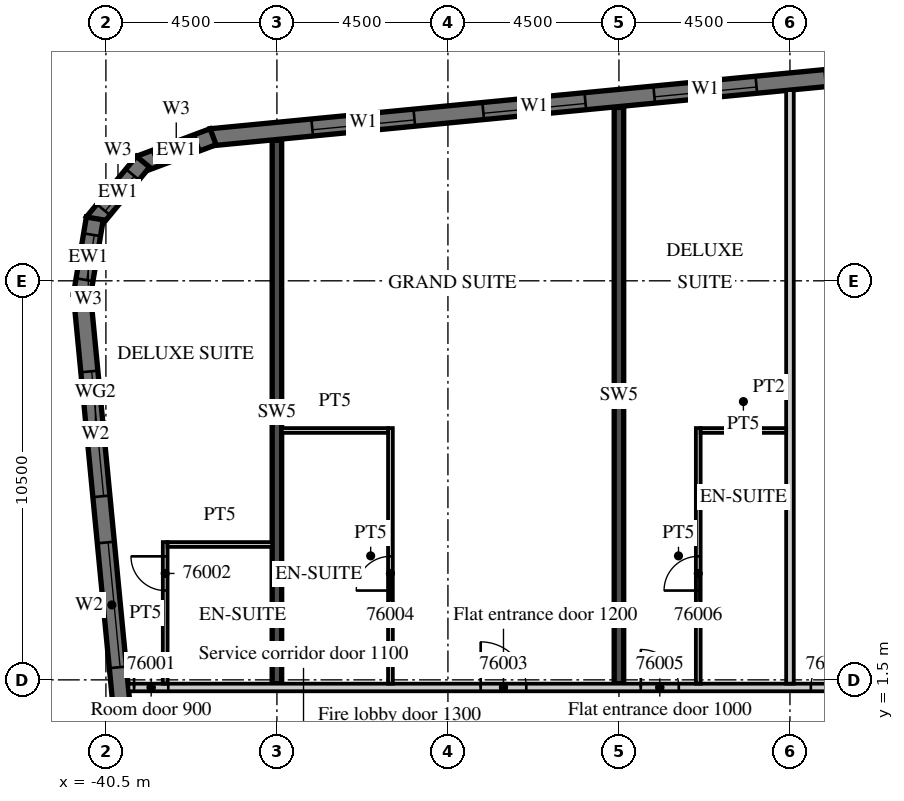
"""IFC4 building model, lengths in metres.
Left out: names, types, materials, properties, quantities, classifications, styles, units other than length and angle.
Written with IfcOpenShell. Run it as: python <this file> out.ifc"""

import sys

from ifc_helpers import new_model, si_unit, direction, frame, frame_2d, origin, place, context, subcontext, project, spatial, polyline, rectangle, outline, extrude, element, fill, save


model = new_model("IFC4")
c1 = context("Model", 3, precision=1e-05, world=origin(), true_north=direction((0.0, 1.0)))
c2 = subcontext(c1, "Body", "Model", "MODEL_VIEW")
j1 = project(units=[si_unit("LENGTHUNIT", "METRE"), si_unit("PLANEANGLEUNIT", "RADIAN")], contexts=[c1])
p1 = place(None, origin())
s1 = spatial("IfcSite", under=j1, at=p1, CompositionType="ELEMENT")
p2 = place(p1, origin())
s2 = spatial("IfcBuilding", under=s1, at=p2, CompositionType="ELEMENT")
p3 = place(p2, frame((0.0, 0.0, 301.5)))
s3 = spatial("IfcBuildingStorey", under=s2, at=p3, CompositionType="ELEMENT", Elevation=301.5)
p4 = place(p3, frame((-36.0, 1.4, 0.0), z_axis=(0.0, 0.0, 1.0), x_axis=(0.0, 1.0, 0.0)))
e1 = element("IfcWall", 1, at=p4, inside=s3, PredefinedType="SHEAR", context=c2, shape_type="SweptSolid", body=[
    extrude(rectangle(XDim=14.296, YDim=0.25, at=frame_2d((7.148, 0.0))), origin(), (0.0, 0.0, 1.0), 3.3),
])
p5 = place(p3, frame((-27.0, 1.4, 0.0), z_axis=(0.0, 0.0, 1.0), x_axis=(0.0, 1.0, 0.0)))
e2 = element("IfcWall", 2, at=p5, inside=s3, PredefinedType="SHEAR", context=c2, shape_type="SweptSolid", body=[
    extrude(rectangle(XDim=15.163, YDim=0.25, at=frame_2d((7.582, 0.0))), origin(), (0.0, 0.0, 1.0), 3.3),
])
p6 = place(p3, frame((-41.132, 11.658, 0.0), z_axis=(0.0, 0.0, 1.0), x_axis=(0.095847749461, -0.995396006082, 0.0)))
e3 = element("IfcWall", 3, at=p6, inside=s3, PredefinedType="SOLIDWALL", context=c2, shape_type="SweptSolid", body=[
    extrude(rectangle(XDim=32.0, YDim=0.45, at=frame_2d((16.0, 0.0))), origin(), (0.0, 0.0, 1.0), 3.02),
])
p7 = place(p6, frame((2.053, 0.0, 0.45)))
e4 = element("IfcOpeningElement", 4, at=p7, cuts=e3, PredefinedType="OPENING", context=c2, shape_type="SweptSolid", body=[
    extrude(rectangle(XDim=3.3, YDim=2.25, at=frame_2d((1.65, 1.125))), frame((0.0, 0.235, 0.0), z_axis=(0.0, -1.0, 0.0), x_axis=(1.0, 0.0, 0.0)), (0.0, 0.0, 1.0), 0.47),
])
p8 = place(p6, frame((6.574, 0.0, 0.45)))
e5 = element("IfcOpeningElement", 5, at=p8, cuts=e3, PredefinedType="OPENING", context=c2, shape_type="SweptSolid", body=[
    extrude(rectangle(XDim=3.3, YDim=2.25, at=frame_2d((1.65, 1.125))), frame((0.0, 0.235, 0.0), z_axis=(0.0, -1.0, 0.0), x_axis=(1.0, 0.0, 0.0)), (0.0, 0.0, 1.0), 0.47),
])
p9 = place(p3, frame((13.521, 20.713, 0.0), z_axis=(0.0, 0.0, 1.0), x_axis=(-0.995396277313, -0.095844932638, 0.0)))
e6 = element("IfcWall", 6, at=p9, inside=s3, PredefinedType="SOLIDWALL", context=c2, shape_type="SweptSolid", body=[
    extrude(rectangle(XDim=51.495, YDim=0.45, at=frame_2d((25.748, 0.0))), origin(), (0.0, 0.0, 1.0), 3.02),
])
p10 = place(p9, frame((0.91, 0.0, 0.45)))
e7 = element("IfcOpeningElement", 7, at=p10, cuts=e6, PredefinedType="OPENING", context=c2, shape_type="SweptSolid", body=[
    extrude(rectangle(XDim=2.7, YDim=2.25, at=frame_2d((1.35, 1.125))), frame((0.0, 0.235, 0.0), z_axis=(0.0, -1.0, 0.0), x_axis=(1.0, 0.0, 0.0)), (0.0, 0.0, 1.0), 0.47),
])
p11 = place(p9, frame((5.431, 0.0, 0.45)))
e8 = element("IfcOpeningElement", 8, at=p11, cuts=e6, PredefinedType="OPENING", context=c2, shape_type="SweptSolid", body=[
    extrude(rectangle(XDim=2.7, YDim=2.25, at=frame_2d((1.35, 1.125))), frame((0.0, 0.235, 0.0), z_axis=(0.0, -1.0, 0.0), x_axis=(1.0, 0.0, 0.0)), (0.0, 0.0, 1.0), 0.47),
])
p12 = place(p9, frame((9.952, 0.0, 0.45)))
e9 = element("IfcOpeningElement", 9, at=p12, cuts=e6, PredefinedType="OPENING", context=c2, shape_type="SweptSolid", body=[
    extrude(rectangle(XDim=2.7, YDim=2.25, at=frame_2d((1.35, 1.125))), frame((0.0, 0.235, 0.0), z_axis=(0.0, -1.0, 0.0), x_axis=(1.0, 0.0, 0.0)), (0.0, 0.0, 1.0), 0.47),
])
p13 = place(p9, frame((14.473, 0.0, 0.45)))
e10 = element("IfcOpeningElement", 10, at=p13, cuts=e6, PredefinedType="OPENING", context=c2, shape_type="SweptSolid", body=[
    extrude(rectangle(XDim=2.7, YDim=2.25, at=frame_2d((1.35, 1.125))), frame((0.0, 0.235, 0.0), z_axis=(0.0, -1.0, 0.0), x_axis=(1.0, 0.0, 0.0)), (0.0, 0.0, 1.0), 0.47),
])
p14 = place(p9, frame((18.994, 0.0, 0.45)))
e11 = element("IfcOpeningElement", 11, at=p14, cuts=e6, PredefinedType="OPENING", context=c2, shape_type="SweptSolid", body=[
    extrude(rectangle(XDim=2.7, YDim=2.25, at=frame_2d((1.35, 1.125))), frame((0.0, 0.235, 0.0), z_axis=(0.0, -1.0, 0.0), x_axis=(1.0, 0.0, 0.0)), (0.0, 0.0, 1.0), 0.47),
])
p15 = place(p9, frame((23.514, 0.0, 0.45)))
e12 = element("IfcOpeningElement", 12, at=p15, cuts=e6, PredefinedType="OPENING", context=c2, shape_type="SweptSolid", body=[
    extrude(rectangle(XDim=2.7, YDim=2.25, at=frame_2d((1.35, 1.125))), frame((0.0, 0.235, 0.0), z_axis=(0.0, -1.0, 0.0), x_axis=(1.0, 0.0, 0.0)), (0.0, 0.0, 1.0), 0.47),
])
p16 = place(p9, frame((28.035, 0.0, 0.45)))
e13 = element("IfcOpeningElement", 13, at=p16, cuts=e6, PredefinedType="OPENING", context=c2, shape_type="SweptSolid", body=[
    extrude(rectangle(XDim=2.7, YDim=2.25, at=frame_2d((1.35, 1.125))), frame((0.0, 0.235, 0.0), z_axis=(0.0, -1.0, 0.0), x_axis=(1.0, 0.0, 0.0)), (0.0, 0.0, 1.0), 0.47),
])
p17 = place(p9, frame((32.556, 0.0, 0.45)))
e14 = element("IfcOpeningElement", 14, at=p17, cuts=e6, PredefinedType="OPENING", context=c2, shape_type="SweptSolid", body=[
    extrude(rectangle(XDim=2.7, YDim=2.25, at=frame_2d((1.35, 1.125))), frame((0.0, 0.235, 0.0), z_axis=(0.0, -1.0, 0.0), x_axis=(1.0, 0.0, 0.0)), (0.0, 0.0, 1.0), 0.47),
])
p18 = place(p9, frame((37.077, 0.0, 0.45)))
e15 = element("IfcOpeningElement", 15, at=p18, cuts=e6, PredefinedType="OPENING", context=c2, shape_type="SweptSolid", body=[
    extrude(rectangle(XDim=2.7, YDim=2.25, at=frame_2d((1.35, 1.125))), frame((0.0, 0.235, 0.0), z_axis=(0.0, -1.0, 0.0), x_axis=(1.0, 0.0, 0.0)), (0.0, 0.0, 1.0), 0.47),
])
p19 = place(p9, frame((41.598, 0.0, 0.45)))
e16 = element("IfcOpeningElement", 16, at=p19, cuts=e6, PredefinedType="OPENING", context=c2, shape_type="SweptSolid", body=[
    extrude(rectangle(XDim=2.7, YDim=2.25, at=frame_2d((1.35, 1.125))), frame((0.0, 0.235, 0.0), z_axis=(0.0, -1.0, 0.0), x_axis=(1.0, 0.0, 0.0)), (0.0, 0.0, 1.0), 0.47),
])
p20 = place(p9, frame((46.118, 0.0, 0.45)))
e17 = element("IfcOpeningElement", 17, at=p20, cuts=e6, PredefinedType="OPENING", context=c2, shape_type="SweptSolid", body=[
    extrude(rectangle(XDim=2.7, YDim=2.25, at=frame_2d((1.35, 1.125))), frame((0.0, 0.235, 0.0), z_axis=(0.0, -1.0, 0.0), x_axis=(1.0, 0.0, 0.0)), (0.0, 0.0, 1.0), 0.47),
])
p21 = place(p3, frame((-37.679, 15.791, 0.0), z_axis=(0.0, 0.0, 1.0), x_axis=(-0.936677599948, -0.350192909346, 0.0)))
e18 = element("IfcWall", 18, at=p21, inside=s3, PredefinedType="SOLIDWALL", context=c2, shape_type="SweptSolid", body=[
    extrude(outline(polyline([(0.0, -0.225), (2.071, -0.225), (1.95, 0.225), (0.121, 0.225), (0.0, -0.225)])), origin(), (0.0, 0.0, 1.0), 3.02),
])
p22 = place(p21, frame((0.435, 0.0, 0.45)))
e19 = element("IfcOpeningElement", 19, at=p22, cuts=e18, PredefinedType="OPENING", context=c2, shape_type="SweptSolid", body=[
    extrude(rectangle(XDim=1.2, YDim=2.25, at=frame_2d((0.6, 1.125))), frame((0.0, 0.235, 0.0), z_axis=(0.0, -1.0, 0.0), x_axis=(1.0, 0.0, 0.0)), (0.0, 0.0, 1.0), 0.47),
])
p23 = place(p3, frame((-39.524, 15.133, 0.0), z_axis=(0.0, 0.0, 1.0), x_axis=(-0.636046112757, -0.771651049663, 0.0)))
e20 = element("IfcWall", 20, at=p23, inside=s3, PredefinedType="SOLIDWALL", context=c2, shape_type="SweptSolid", body=[
    extrude(outline(polyline([(0.0, -0.225), (2.071, -0.225), (1.95, 0.225), (0.121, 0.225), (0.0, -0.225)])), origin(), (0.0, 0.0, 1.0), 3.02),
])
p24 = place(p23, frame((0.435, 0.0, 0.45)))
e21 = element("IfcOpeningElement", 21, at=p24, cuts=e20, PredefinedType="OPENING", context=c2, shape_type="SweptSolid", body=[
    extrude(rectangle(XDim=1.2, YDim=2.25, at=frame_2d((0.6, 1.125))), frame((0.0, 0.235, 0.0), z_axis=(0.0, -1.0, 0.0), x_axis=(1.0, 0.0, 0.0)), (0.0, 0.0, 1.0), 0.47),
])
p25 = place(p3, frame((-40.792, 13.641, 0.0), z_axis=(0.0, 0.0, 1.0), x_axis=(-0.165068144653, -0.986282164302, 0.0)))
e22 = element("IfcWall", 22, at=p25, inside=s3, PredefinedType="SOLIDWALL", context=c2, shape_type="SweptSolid", body=[
    extrude(outline(polyline([(0.0, -0.225), (2.071, -0.225), (1.95, 0.225), (0.121, 0.225), (0.0, -0.225)])), origin(), (0.0, 0.0, 1.0), 3.02),
])
p26 = place(p25, frame((0.435, 0.0, 0.45)))
e23 = element("IfcOpeningElement", 23, at=p26, cuts=e22, PredefinedType="OPENING", context=c2, shape_type="SweptSolid", body=[
    extrude(rectangle(XDim=1.2, YDim=2.25, at=frame_2d((0.6, 1.125))), frame((0.0, 0.235, 0.0), z_axis=(0.0, -1.0, 0.0), x_axis=(1.0, 0.0, 0.0)), (0.0, 0.0, 1.0), 0.47),
])
p27 = place(p3, frame((-39.909, 1.3, 0.0), z_axis=(0.0, 0.0, 1.0), x_axis=(1.0, 0.0, 0.0)))
e24 = element("IfcWall", 24, at=p27, inside=s3, PredefinedType="PARTITIONING", context=c2, shape_type="SweptSolid", body=[
    extrude(rectangle(XDim=53.409, YDim=0.2, at=frame_2d((26.705, 0.0))), origin(), (0.0, 0.0, 1.0), 3.02),
])
p28 = place(p27, frame((0.15, 0.0, 0.0)))
e25 = element("IfcOpeningElement", 25, at=p28, cuts=e24, PredefinedType="OPENING", context=c2, shape_type="SweptSolid", body=[
    extrude(rectangle(XDim=0.9, YDim=2.1, at=frame_2d((0.45, 1.05))), frame((0.0, 0.11, 0.0), z_axis=(0.0, -1.0, 0.0), x_axis=(1.0, 0.0, 0.0)), (0.0, 0.0, 1.0), 0.22),
])
p29 = place(p27, frame((9.271, 0.0, 0.0)))
e26 = element("IfcOpeningElement", 26, at=p29, cuts=e24, PredefinedType="OPENING", context=c2, shape_type="SweptSolid", body=[
    extrude(rectangle(XDim=1.2, YDim=2.1, at=frame_2d((0.6, 1.05))), frame((0.0, 0.11, 0.0), z_axis=(0.0, -1.0, 0.0), x_axis=(1.0, 0.0, 0.0)), (0.0, 0.0, 1.0), 0.22),
])
p30 = place(p27, frame((13.484, 0.0, 0.0)))
e27 = element("IfcOpeningElement", 27, at=p30, cuts=e24, PredefinedType="OPENING", context=c2, shape_type="SweptSolid", body=[
    extrude(rectangle(XDim=1.0, YDim=2.1, at=frame_2d((0.5, 1.05))), frame((0.0, 0.11, 0.0), z_axis=(0.0, -1.0, 0.0), x_axis=(1.0, 0.0, 0.0)), (0.0, 0.0, 1.0), 0.22),
])
p31 = place(p27, frame((17.959, 0.0, 0.0)))
e28 = element("IfcOpeningElement", 28, at=p31, cuts=e24, PredefinedType="OPENING", context=c2, shape_type="SweptSolid", body=[
    extrude(rectangle(XDim=1.0, YDim=2.1, at=frame_2d((0.5, 1.05))), frame((0.0, 0.11, 0.0), z_axis=(0.0, -1.0, 0.0), x_axis=(1.0, 0.0, 0.0)), (0.0, 0.0, 1.0), 0.22),
])
p32 = place(p27, frame((24.859, 0.0, 0.0)))
e29 = element("IfcOpeningElement", 29, at=p32, cuts=e24, PredefinedType="OPENING", context=c2, shape_type="SweptSolid", body=[
    extrude(rectangle(XDim=1.0, YDim=2.1, at=frame_2d((0.5, 1.05))), frame((0.0, 0.11, 0.0), z_axis=(0.0, -1.0, 0.0), x_axis=(1.0, 0.0, 0.0)), (0.0, 0.0, 1.0), 0.22),
])
p33 = place(p27, frame((29.334, 0.0, 0.0)))
e30 = element("IfcOpeningElement", 30, at=p33, cuts=e24, PredefinedType="OPENING", context=c2, shape_type="SweptSolid", body=[
    extrude(rectangle(XDim=1.0, YDim=2.1, at=frame_2d((0.5, 1.05))), frame((0.0, 0.11, 0.0), z_axis=(0.0, -1.0, 0.0), x_axis=(1.0, 0.0, 0.0)), (0.0, 0.0, 1.0), 0.22),
])
p34 = place(p27, frame((36.271, 0.0, 0.0)))
e31 = element("IfcOpeningElement", 31, at=p34, cuts=e24, PredefinedType="OPENING", context=c2, shape_type="SweptSolid", body=[
    extrude(rectangle(XDim=1.2, YDim=2.1, at=frame_2d((0.6, 1.05))), frame((0.0, 0.11, 0.0), z_axis=(0.0, -1.0, 0.0), x_axis=(1.0, 0.0, 0.0)), (0.0, 0.0, 1.0), 0.22),
])
p35 = place(p27, frame((40.484, 0.0, 0.0)))
e32 = element("IfcOpeningElement", 32, at=p35, cuts=e24, PredefinedType="OPENING", context=c2, shape_type="SweptSolid", body=[
    extrude(rectangle(XDim=1.0, YDim=2.1, at=frame_2d((0.5, 1.05))), frame((0.0, 0.11, 0.0), z_axis=(0.0, -1.0, 0.0), x_axis=(1.0, 0.0, 0.0)), (0.0, 0.0, 1.0), 0.22),
])
p36 = place(p27, frame((47.334, 0.0, 0.0)))
e33 = element("IfcOpeningElement", 33, at=p36, cuts=e24, PredefinedType="OPENING", context=c2, shape_type="SweptSolid", body=[
    extrude(rectangle(XDim=1.0, YDim=2.1, at=frame_2d((0.5, 1.05))), frame((0.0, 0.11, 0.0), z_axis=(0.0, -1.0, 0.0), x_axis=(1.0, 0.0, 0.0)), (0.0, 0.0, 1.0), 0.22),
])
p37 = place(p27, frame((51.834, 0.0, 0.0)))
e34 = element("IfcOpeningElement", 34, at=p37, cuts=e24, PredefinedType="OPENING", context=c2, shape_type="SweptSolid", body=[
    extrude(rectangle(XDim=1.0, YDim=2.1, at=frame_2d((0.5, 1.05))), frame((0.0, 0.11, 0.0), z_axis=(0.0, -1.0, 0.0), x_axis=(1.0, 0.0, 0.0)), (0.0, 0.0, 1.0), 0.22),
])
p38 = place(p3, frame((-38.94, 1.4, 0.0), z_axis=(0.0, 0.0, 1.0), x_axis=(0.0, 1.0, 0.0)))
e35 = element("IfcWall", 35, at=p38, inside=s3, PredefinedType="PARTITIONING", context=c2, shape_type="SweptSolid", body=[
    extrude(rectangle(XDim=3.725, YDim=0.125, at=frame_2d((1.863, 0.0))), origin(), (0.0, 0.0, 1.0), 3.02),
])
p39 = place(p38, frame((2.45, 0.0, 0.0)))
e36 = element("IfcOpeningElement", 36, at=p39, cuts=e35, PredefinedType="OPENING", context=c2, shape_type="SweptSolid", body=[
    extrude(rectangle(XDim=0.9, YDim=2.1, at=frame_2d((0.45, 1.05))), frame((0.0, 0.073, 0.0), z_axis=(0.0, -1.0, 0.0), x_axis=(1.0, 0.0, 0.0)), (0.0, 0.0, 1.0), 0.145),
])
p40 = place(p3, frame((-38.878, 5.062, 0.0), z_axis=(0.0, 0.0, 1.0), x_axis=(1.0, 0.0, 0.0)))
e37 = element("IfcWall", 37, at=p40, inside=s3, PredefinedType="PARTITIONING", context=c2, shape_type="SweptSolid", body=[
    extrude(rectangle(XDim=2.753, YDim=0.125, at=frame_2d((1.376, 0.0))), origin(), (0.0, 0.0, 1.0), 3.02),
])
p41 = place(p3, frame((-33.013, 1.4, 0.0), z_axis=(0.0, 0.0, 1.0), x_axis=(0.0, 1.0, 0.0)))
e38 = element("IfcWall", 38, at=p41, inside=s3, PredefinedType="PARTITIONING", context=c2, shape_type="SweptSolid", body=[
    extrude(rectangle(XDim=6.725, YDim=0.125, at=frame_2d((3.363, 0.0))), origin(), (0.0, 0.0, 1.0), 3.02),
])
p42 = place(p41, frame((2.45, 0.0, 0.0)))
e39 = element("IfcOpeningElement", 39, at=p42, cuts=e38, PredefinedType="OPENING", context=c2, shape_type="SweptSolid", body=[
    extrude(rectangle(XDim=0.9, YDim=2.1, at=frame_2d((0.45, 1.05))), frame((0.0, 0.073, 0.0), z_axis=(0.0, -1.0, 0.0), x_axis=(1.0, 0.0, 0.0)), (0.0, 0.0, 1.0), 0.145),
])
p43 = place(p3, frame((-35.875, 8.062, 0.0), z_axis=(0.0, 0.0, 1.0), x_axis=(1.0, 0.0, 0.0)))
e40 = element("IfcWall", 40, at=p43, inside=s3, PredefinedType="PARTITIONING", context=c2, shape_type="SweptSolid", body=[
    extrude(rectangle(XDim=2.8, YDim=0.125, at=frame_2d((1.4, 0.0))), origin(), (0.0, 0.0, 1.0), 3.02),
])
p44 = place(p3, frame((-22.5, 1.4, 0.0), z_axis=(0.0, 0.0, 1.0), x_axis=(0.0, 1.0, 0.0)))
e41 = element("IfcWall", 41, at=p44, inside=s3, PredefinedType="PARTITIONING", context=c2, shape_type="SweptSolid", body=[
    extrude(rectangle(XDim=15.618, YDim=0.2, at=frame_2d((7.809, 0.0))), origin(), (0.0, 0.0, 1.0), 3.02),
])
p45 = place(p3, frame((-24.913, 1.4, 0.0), z_axis=(0.0, 0.0, 1.0), x_axis=(0.0, 1.0, 0.0)))
e42 = element("IfcWall", 42, at=p45, inside=s3, PredefinedType="PARTITIONING", context=c2, shape_type="SweptSolid", body=[
    extrude(rectangle(XDim=6.725, YDim=0.125, at=frame_2d((3.363, 0.0))), origin(), (0.0, 0.0, 1.0), 3.02),
])
p46 = place(p45, frame((2.45, 0.0, 0.0)))
e43 = element("IfcOpeningElement", 43, at=p46, cuts=e42, PredefinedType="OPENING", context=c2, shape_type="SweptSolid", body=[
    extrude(rectangle(XDim=0.9, YDim=2.1, at=frame_2d((0.45, 1.05))), frame((0.0, 0.073, 0.0), z_axis=(0.0, -1.0, 0.0), x_axis=(1.0, 0.0, 0.0)), (0.0, 0.0, 1.0), 0.145),
])
p47 = place(p3, frame((-24.85, 8.062, 0.0), z_axis=(0.0, 0.0, 1.0), x_axis=(1.0, 0.0, 0.0)))
e44 = element("IfcWall", 44, at=p47, inside=s3, PredefinedType="PARTITIONING", context=c2, shape_type="SweptSolid", body=[
    extrude(rectangle(XDim=2.25, YDim=0.125, at=frame_2d((1.125, 0.0))), origin(), (0.0, 0.0, 1.0), 3.02),
])
p48 = place(p7, origin())
e45 = element("IfcWindow", 45, at=p48, inside=s3, PartitioningType="SINGLE_PANEL", PredefinedType="WINDOW", context=c2, shape_type="SweptSolid", body=[
    extrude(rectangle(XDim=3.3, YDim=2.25, at=frame_2d((1.65, 1.125))), frame((0.0, 0.09, 0.0), z_axis=(0.0, -1.0, 0.0), x_axis=(1.0, 0.0, 0.0)), (0.0, 0.0, 1.0), 0.06),
])
fill(e4, e45)
p49 = place(p8, origin())
e46 = element("IfcWindow", 46, at=p49, inside=s3, PartitioningType="SINGLE_PANEL", PredefinedType="WINDOW", context=c2, shape_type="SweptSolid", body=[
    extrude(rectangle(XDim=3.3, YDim=2.25, at=frame_2d((1.65, 1.125))), frame((0.0, 0.09, 0.0), z_axis=(0.0, -1.0, 0.0), x_axis=(1.0, 0.0, 0.0)), (0.0, 0.0, 1.0), 0.06),
])
fill(e5, e46)
p50 = place(p18, origin())
e47 = element("IfcWindow", 47, at=p50, inside=s3, PartitioningType="SINGLE_PANEL", PredefinedType="WINDOW", context=c2, shape_type="SweptSolid", body=[
    extrude(rectangle(XDim=2.7, YDim=2.25, at=frame_2d((1.35, 1.125))), frame((0.0, 0.09, 0.0), z_axis=(0.0, -1.0, 0.0), x_axis=(1.0, 0.0, 0.0)), (0.0, 0.0, 1.0), 0.06),
])
fill(e15, e47)
p51 = place(p19, origin())
e48 = element("IfcWindow", 48, at=p51, inside=s3, PartitioningType="SINGLE_PANEL", PredefinedType="WINDOW", context=c2, shape_type="SweptSolid", body=[
    extrude(rectangle(XDim=2.7, YDim=2.25, at=frame_2d((1.35, 1.125))), frame((0.0, 0.09, 0.0), z_axis=(0.0, -1.0, 0.0), x_axis=(1.0, 0.0, 0.0)), (0.0, 0.0, 1.0), 0.06),
])
fill(e16, e48)
p52 = place(p20, origin())
e49 = element("IfcWindow", 49, at=p52, inside=s3, PartitioningType="SINGLE_PANEL", PredefinedType="WINDOW", context=c2, shape_type="SweptSolid", body=[
    extrude(rectangle(XDim=2.7, YDim=2.25, at=frame_2d((1.35, 1.125))), frame((0.0, 0.09, 0.0), z_axis=(0.0, -1.0, 0.0), x_axis=(1.0, 0.0, 0.0)), (0.0, 0.0, 1.0), 0.06),
])
fill(e17, e49)
p53 = place(p22, origin())
e50 = element("IfcWindow", 50, at=p53, inside=s3, PartitioningType="SINGLE_PANEL", PredefinedType="WINDOW", context=c2, shape_type="SweptSolid", body=[
    extrude(rectangle(XDim=1.2, YDim=2.25, at=frame_2d((0.6, 1.125))), frame((0.0, 0.09, 0.0), z_axis=(0.0, -1.0, 0.0), x_axis=(1.0, 0.0, 0.0)), (0.0, 0.0, 1.0), 0.06),
])
fill(e19, e50)
p54 = place(p24, origin())
e51 = element("IfcWindow", 51, at=p54, inside=s3, PartitioningType="SINGLE_PANEL", PredefinedType="WINDOW", context=c2, shape_type="SweptSolid", body=[
    extrude(rectangle(XDim=1.2, YDim=2.25, at=frame_2d((0.6, 1.125))), frame((0.0, 0.09, 0.0), z_axis=(0.0, -1.0, 0.0), x_axis=(1.0, 0.0, 0.0)), (0.0, 0.0, 1.0), 0.06),
])
fill(e21, e51)
p55 = place(p26, origin())
e52 = element("IfcWindow", 52, at=p55, inside=s3, PartitioningType="SINGLE_PANEL", PredefinedType="WINDOW", context=c2, shape_type="SweptSolid", body=[
    extrude(rectangle(XDim=1.2, YDim=2.25, at=frame_2d((0.6, 1.125))), frame((0.0, 0.09, 0.0), z_axis=(0.0, -1.0, 0.0), x_axis=(1.0, 0.0, 0.0)), (0.0, 0.0, 1.0), 0.06),
])
fill(e23, e52)
p56 = place(p28, origin())
e53 = element("IfcDoor", 53, at=p56, inside=s3, OperationType="SINGLE_SWING_LEFT", PredefinedType="DOOR", context=c2, shape_type="SweptSolid", body=[
    extrude(rectangle(XDim=0.9, YDim=2.1, at=frame_2d((0.45, 1.05))), frame((0.0, 0.025, 0.0), z_axis=(0.0, -1.0, 0.0), x_axis=(1.0, 0.0, 0.0)), (0.0, 0.0, 1.0), 0.05),
])
fill(e25, e53)
p57 = place(p39, origin())
e54 = element("IfcDoor", 54, at=p57, inside=s3, OperationType="SINGLE_SWING_RIGHT", PredefinedType="DOOR", context=c2, shape_type="SweptSolid", body=[
    extrude(rectangle(XDim=0.9, YDim=2.1, at=frame_2d((0.45, 1.05))), frame((0.0, 0.025, 0.0), z_axis=(0.0, -1.0, 0.0), x_axis=(1.0, 0.0, 0.0)), (0.0, 0.0, 1.0), 0.05),
])
fill(e36, e54)
p58 = place(p29, origin())
e55 = element("IfcDoor", 55, at=p58, inside=s3, OperationType="SINGLE_SWING_LEFT", PredefinedType="DOOR", context=c2, shape_type="SweptSolid", body=[
    extrude(rectangle(XDim=1.2, YDim=2.1, at=frame_2d((0.6, 1.05))), frame((0.0, 0.025, 0.0), z_axis=(0.0, -1.0, 0.0), x_axis=(1.0, 0.0, 0.0)), (0.0, 0.0, 1.0), 0.05),
])
fill(e26, e55)
p59 = place(p42, origin())
e56 = element("IfcDoor", 56, at=p59, inside=s3, OperationType="SINGLE_SWING_LEFT", PredefinedType="DOOR", context=c2, shape_type="SweptSolid", body=[
    extrude(rectangle(XDim=0.9, YDim=2.1, at=frame_2d((0.45, 1.05))), frame((0.0, 0.025, 0.0), z_axis=(0.0, -1.0, 0.0), x_axis=(1.0, 0.0, 0.0)), (0.0, 0.0, 1.0), 0.05),
])
fill(e39, e56)
p60 = place(p30, origin())
e57 = element("IfcDoor", 57, at=p60, inside=s3, OperationType="SINGLE_SWING_LEFT", PredefinedType="DOOR", context=c2, shape_type="SweptSolid", body=[
    extrude(rectangle(XDim=1.0, YDim=2.1, at=frame_2d((0.5, 1.05))), frame((0.0, 0.025, 0.0), z_axis=(0.0, -1.0, 0.0), x_axis=(1.0, 0.0, 0.0)), (0.0, 0.0, 1.0), 0.05),
])
fill(e27, e57)
p61 = place(p46, origin())
e58 = element("IfcDoor", 58, at=p61, inside=s3, OperationType="SINGLE_SWING_LEFT", PredefinedType="DOOR", context=c2, shape_type="SweptSolid", body=[
    extrude(rectangle(XDim=0.9, YDim=2.1, at=frame_2d((0.45, 1.05))), frame((0.0, 0.025, 0.0), z_axis=(0.0, -1.0, 0.0), x_axis=(1.0, 0.0, 0.0)), (0.0, 0.0, 1.0), 0.05),
])
fill(e43, e58)
p62 = place(p31, origin())
e59 = element("IfcDoor", 59, at=p62, inside=s3, OperationType="SINGLE_SWING_RIGHT", PredefinedType="DOOR", context=c2, shape_type="SweptSolid", body=[
    extrude(rectangle(XDim=1.0, YDim=2.1, at=frame_2d((0.5, 1.05))), frame((0.0, 0.025, 0.0), z_axis=(0.0, -1.0, 0.0), x_axis=(1.0, 0.0, 0.0)), (0.0, 0.0, 1.0), 0.05),
])
fill(e28, e59)
save(model, sys.argv[1])
